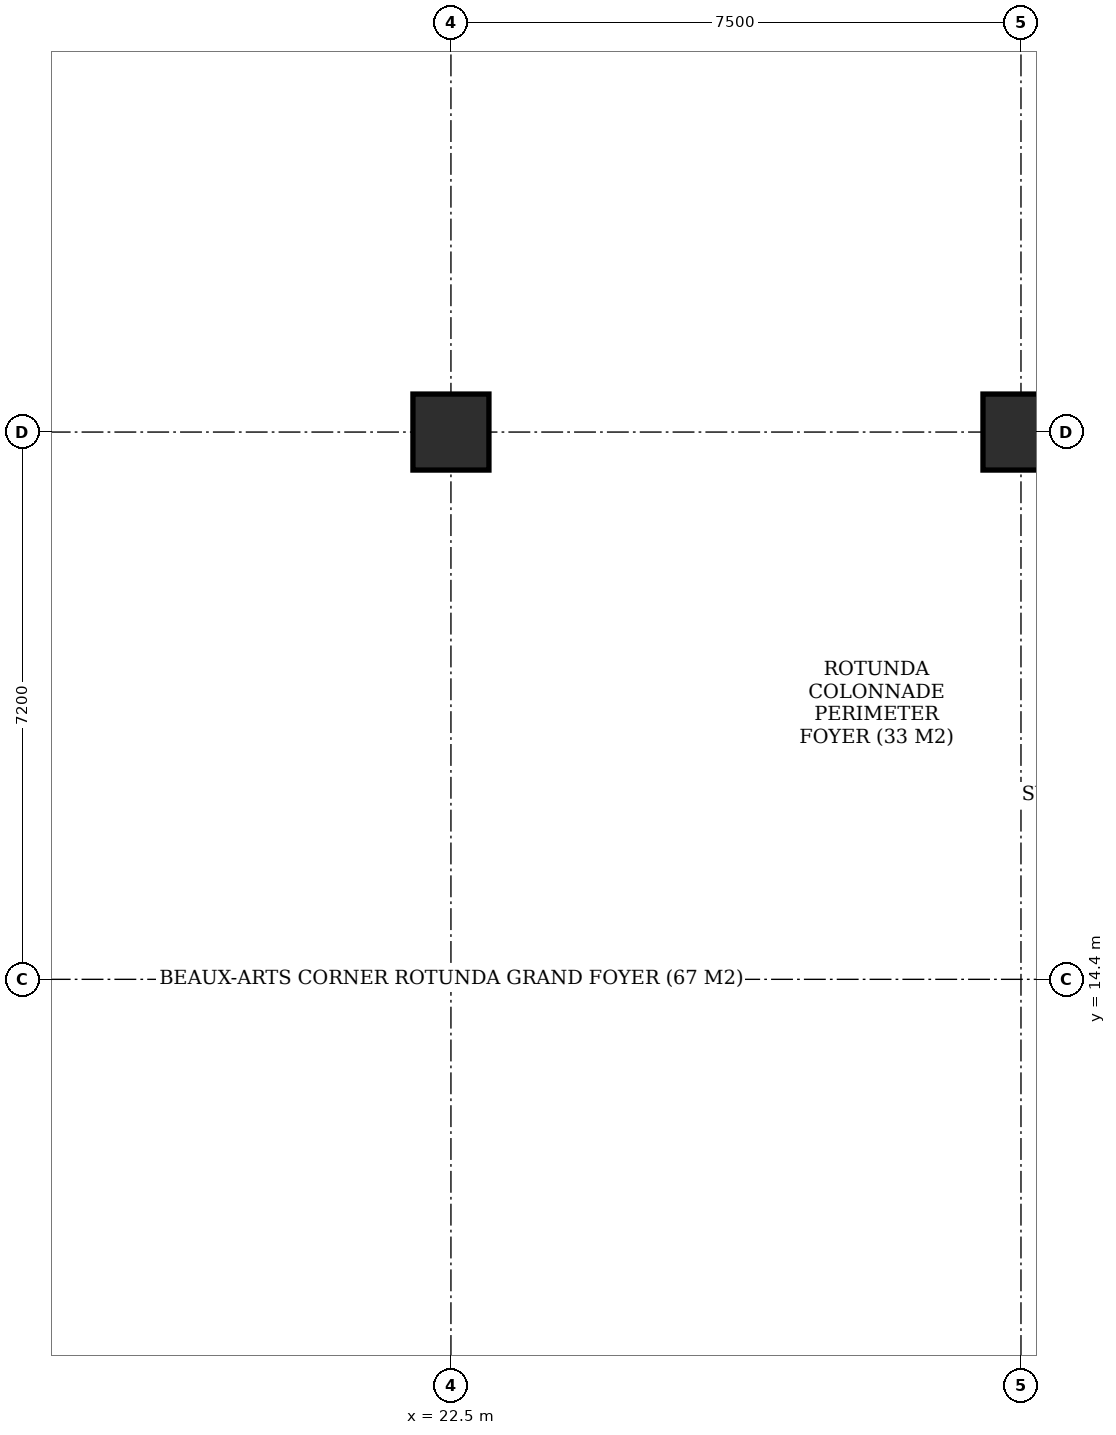
"""IFC4 building model, lengths in metres.
Left out: names, types, materials, properties, quantities, classifications, styles, units other than length and angle.
Written with IfcOpenShell. Run it as: python <this file> out.ifc"""

import sys

from ifc_helpers import new_model, si_unit, direction, frame, origin, origin_2d, place, context, subcontext, project, spatial, circle, extrude, element, save


model = new_model("IFC4")
c1 = context("Model", 3, precision=1e-05, world=origin(), true_north=direction((0.0, 1.0)))
c2 = subcontext(c1, "Body", "Model", "MODEL_VIEW")
j1 = project(units=[si_unit("LENGTHUNIT", "METRE"), si_unit("PLANEANGLEUNIT", "RADIAN")], contexts=[c1])
p1 = place(None, origin())
s1 = spatial("IfcSite", under=j1, at=p1, CompositionType="ELEMENT")
p2 = place(p1, origin())
s2 = spatial("IfcBuilding", under=s1, at=p2, CompositionType="ELEMENT")
p3 = place(p2, origin())
s3 = spatial("IfcBuildingStorey", under=s2, at=p3, CompositionType="ELEMENT", Elevation=0.0)
for number, where, z_axis, x_axis in (
    (1, (22.5, 21.6, -0.35), (0.0, 0.0, 1.0), (1.0, 0.0, 0.0)),
    (2, (30.0, 21.6, -0.35), (0.0, 0.0, 1.0), (1.0, 0.0, 0.0)),
):
    element("IfcColumn", number, at=place(p3, frame(where, z_axis=z_axis, x_axis=x_axis)), inside=s3, PredefinedType="COLUMN", context=c2, shape_type="SweptSolid", body=[
        extrude(circle(Radius=0.5, at=origin_2d()), origin(), (0.0, 0.0, 1.0), 4.65),
    ])
save(model, sys.argv[1])
